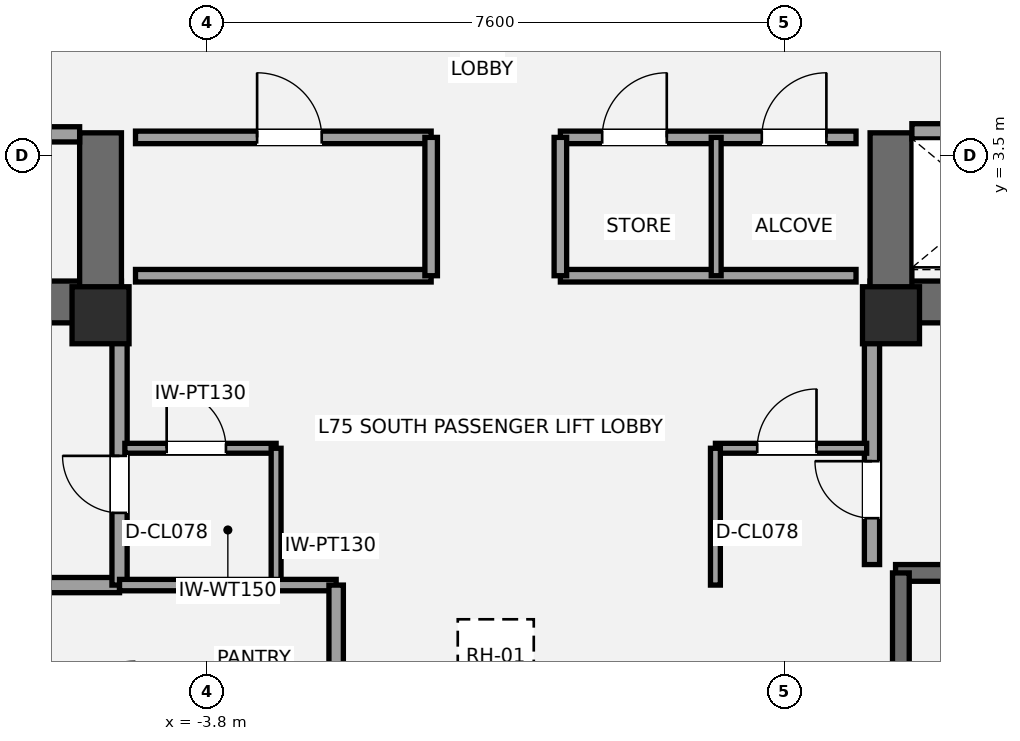
"""IFC4 building model, lengths in metres.
Left out: names, types, materials, properties, quantities, classifications, styles, units other than length and angle.
Written with IfcOpenShell. Run it as: python <this file> out.ifc"""

import sys

from ifc_helpers import new_model, si_unit, direction, frame, frame_2d, origin, origin_2d, place, context, subcontext, project, spatial, rectangle, extrude, element, fill, save


model = new_model("IFC4")
c1 = context("Model", 3, precision=1e-05, world=origin(), true_north=direction((0.0, 1.0)))
c2 = subcontext(c1, "Body", "Model", "MODEL_VIEW")
j1 = project(units=[si_unit("LENGTHUNIT", "METRE"), si_unit("PLANEANGLEUNIT", "RADIAN")], contexts=[c1])
p1 = place(None, origin())
s1 = spatial("IfcSite", under=j1, at=p1, CompositionType="ELEMENT")
p2 = place(p1, origin())
s2 = spatial("IfcBuilding", under=s1, at=p2, CompositionType="ELEMENT")
p3 = place(p2, frame((0.0, 0.0, 264.8)))
s3 = spatial("IfcBuildingStorey", under=s2, at=p3, CompositionType="ELEMENT", Elevation=264.8)
p4 = place(p3, frame((-4.925, 1.575, 0.0), z_axis=(0.0, 0.0, 1.0), x_axis=(-1.0, 0.0, 0.0)))
e1 = element("IfcWall", 1, at=p4, inside=s3, PredefinedType="SHEAR", context=c2, shape_type="SweptSolid", body=[
    extrude(rectangle(XDim=8.775, YDim=0.55, at=frame_2d((4.387, 0.0))), origin(), (0.0, 0.0, 1.0), 4.4),
])
p5 = place(p4, frame((5.375, 0.0, 0.0)))
e2 = element("IfcOpeningElement", 2, at=p5, cuts=e1, PredefinedType="OPENING", context=c2, shape_type="SweptSolid", body=[
    extrude(rectangle(XDim=1.05, YDim=2.15, at=frame_2d((0.525, 1.075))), frame((0.0, 0.285, 0.0), z_axis=(0.0, -1.0, 0.0), x_axis=(1.0, 0.0, 0.0)), (0.0, 0.0, 1.0), 0.57),
])
p6 = place(p4, frame((3.705, 0.0, 0.0)))
e3 = element("IfcOpeningElement", 3, at=p6, cuts=e1, PredefinedType="OPENING", context=c2, shape_type="SweptSolid", body=[
    extrude(rectangle(XDim=1.1, YDim=2.2, at=frame_2d((0.55, 1.1))), frame((0.0, 0.285, 0.0), z_axis=(0.0, -1.0, 0.0), x_axis=(1.0, 0.0, 0.0)), (0.0, 0.0, 1.0), 0.57),
])
p7 = place(p3, frame((-5.2, 1.3, 0.0), z_axis=(0.0, 0.0, 1.0), x_axis=(0.0, 1.0, 0.0)))
e4 = element("IfcWall", 4, at=p7, inside=s3, PredefinedType="SHEAR", context=c2, shape_type="SweptSolid", body=[
    extrude(rectangle(XDim=2.5, YDim=0.55, at=frame_2d((1.25, 0.0))), origin(), (0.0, 0.0, 1.0), 4.4),
])
p8 = place(p3, frame((13.7, 1.575, 0.0), z_axis=(0.0, 0.0, 1.0), x_axis=(-1.0, 0.0, 0.0)))
e5 = element("IfcWall", 5, at=p8, inside=s3, PredefinedType="SHEAR", context=c2, shape_type="SweptSolid", body=[
    extrude(rectangle(XDim=8.775, YDim=0.55, at=frame_2d((4.387, 0.0))), origin(), (0.0, 0.0, 1.0), 4.4),
])
p9 = place(p8, frame((2.35, 0.0, 0.0)))
e6 = element("IfcOpeningElement", 6, at=p9, cuts=e5, PredefinedType="OPENING", context=c2, shape_type="SweptSolid", body=[
    extrude(rectangle(XDim=1.05, YDim=2.15, at=frame_2d((0.525, 1.075))), frame((0.0, 0.285, 0.0), z_axis=(0.0, -1.0, 0.0), x_axis=(1.0, 0.0, 0.0)), (0.0, 0.0, 1.0), 0.57),
])
p10 = place(p8, frame((4.35, 0.0, 0.0)))
e7 = element("IfcOpeningElement", 7, at=p10, cuts=e5, PredefinedType="OPENING", context=c2, shape_type="SweptSolid", body=[
    extrude(rectangle(XDim=1.1, YDim=2.2, at=frame_2d((0.55, 1.1))), frame((0.0, 0.285, 0.0), z_axis=(0.0, -1.0, 0.0), x_axis=(1.0, 0.0, 0.0)), (0.0, 0.0, 1.0), 0.57),
])
p11 = place(p3, frame((5.2, 1.3, 0.0), z_axis=(0.0, 0.0, 1.0), x_axis=(0.0, 1.0, 0.0)))
e8 = element("IfcWall", 8, at=p11, inside=s3, PredefinedType="SHEAR", context=c2, shape_type="SweptSolid", body=[
    extrude(rectangle(XDim=2.5, YDim=0.55, at=frame_2d((1.25, 0.0))), origin(), (0.0, 0.0, 1.0), 4.4),
])
p12 = place(p3, frame((5.26, -1.99, 0.0), z_axis=(0.0, 0.0, 1.0), x_axis=(1.0, 0.0, 0.0)))
e9 = element("IfcWall", 9, at=p12, inside=s3, PredefinedType="SHEAR", context=c2, shape_type="SweptSolid", body=[
    extrude(rectangle(XDim=7.5, YDim=0.22, at=frame_2d((3.75, 0.0))), origin(), (0.0, 0.0, 1.0), 4.4),
])
p13 = place(p3, frame((5.33, -5.36, 0.0), z_axis=(0.0, 0.0, 1.0), x_axis=(0.0, 1.0, 0.0)))
e10 = element("IfcWall", 10, at=p13, inside=s3, PredefinedType="SHEAR", context=c2, shape_type="SweptSolid", body=[
    extrude(rectangle(XDim=3.37, YDim=0.22, at=frame_2d((1.685, 0.0))), origin(), (0.0, 0.0, 1.0), 4.4),
])
for number, where, z_axis, x_axis in (
    (11, (-5.2, 1.4, 0.0), (0.0, 0.0, 1.0), (1.0, 0.0, 0.0)),
    (12, (5.2, 1.4, 0.0), (0.0, 0.0, 1.0), (1.0, 0.0, 0.0)),
):
    element("IfcColumn", number, at=place(p3, frame(where, z_axis=z_axis, x_axis=x_axis)), inside=s3, PredefinedType="PILASTER", context=c2, shape_type="SweptSolid", body=[
        extrude(rectangle(XDim=0.75, YDim=0.75, at=origin_2d()), origin(), (0.0, 0.0, 1.0), 4.4),
    ])
p14 = place(p3, frame((-7.2, -2.15, 0.0), z_axis=(0.0, 0.0, 1.0), x_axis=(1.0, 0.0, 0.0)))
e13 = element("IfcWall", 13, at=p14, inside=s3, PredefinedType="SOLIDWALL", context=c2, shape_type="SweptSolid", body=[
    extrude(rectangle(XDim=2.25, YDim=0.2, at=frame_2d((1.125, 0.0))), origin(), (0.0, 0.0, 1.0), 4.2),
])
p15 = place(p3, frame((-4.95, -2.15, 0.0), z_axis=(0.0, 0.0, 1.0), x_axis=(0.0, 1.0, 0.0)))
e14 = element("IfcWall", 14, at=p15, inside=s3, PredefinedType="SOLIDWALL", context=c2, shape_type="SweptSolid", body=[
    extrude(rectangle(XDim=3.5, YDim=0.2, at=frame_2d((1.75, 0.0))), origin(), (0.0, 0.0, 1.0), 3.568),
])
p16 = place(p15, frame((0.95, 0.0, 0.0)))
e15 = element("IfcOpeningElement", 15, at=p16, cuts=e14, PredefinedType="OPENING", context=c2, shape_type="SweptSolid", body=[
    extrude(rectangle(XDim=0.75, YDim=2.1, at=frame_2d((0.375, 1.05))), frame((0.0, 0.11, 0.0), z_axis=(0.0, -1.0, 0.0), x_axis=(1.0, 0.0, 0.0)), (0.0, 0.0, 1.0), 0.22),
])
p17 = place(p3, frame((4.95, -1.88, 0.0), z_axis=(0.0, 0.0, 1.0), x_axis=(0.0, 1.0, 0.0)))
e16 = element("IfcWall", 16, at=p17, inside=s3, PredefinedType="SOLIDWALL", context=c2, shape_type="SweptSolid", body=[
    extrude(rectangle(XDim=3.23, YDim=0.2, at=frame_2d((1.615, 0.0))), origin(), (0.0, 0.0, 1.0), 3.568),
])
p18 = place(p17, frame((0.61, 0.0, 0.0)))
e17 = element("IfcOpeningElement", 17, at=p18, cuts=e16, PredefinedType="OPENING", context=c2, shape_type="SweptSolid", body=[
    extrude(rectangle(XDim=0.75, YDim=2.1, at=frame_2d((0.375, 1.05))), frame((0.0, 0.11, 0.0), z_axis=(0.0, -1.0, 0.0), x_axis=(1.0, 0.0, 0.0)), (0.0, 0.0, 1.0), 0.22),
])
p19 = place(p3, frame((-4.88, -0.35, 0.0), z_axis=(0.0, 0.0, 1.0), x_axis=(1.0, 0.0, 0.0)))
e18 = element("IfcWall", 18, at=p19, inside=s3, PredefinedType="PARTITIONING", context=c2, shape_type="SweptSolid", body=[
    extrude(rectangle(XDim=1.99, YDim=0.13, at=frame_2d((0.995, 0.0))), origin(), (0.0, 0.0, 1.0), 4.2),
])
p20 = place(p19, frame((0.55, 0.0, 0.0)))
e19 = element("IfcOpeningElement", 19, at=p20, cuts=e18, PredefinedType="OPENING", context=c2, shape_type="SweptSolid", body=[
    extrude(rectangle(XDim=0.78, YDim=2.1, at=frame_2d((0.39, 1.05))), frame((0.0, 0.075, 0.0), z_axis=(0.0, -1.0, 0.0), x_axis=(1.0, 0.0, 0.0)), (0.0, 0.0, 1.0), 0.15),
])
p21 = place(p3, frame((-2.89, -2.15, 0.0), z_axis=(0.0, 0.0, 1.0), x_axis=(0.0, 1.0, 0.0)))
e20 = element("IfcWall", 20, at=p21, inside=s3, PredefinedType="PARTITIONING", context=c2, shape_type="SweptSolid", body=[
    extrude(rectangle(XDim=1.8, YDim=0.13, at=frame_2d((0.9, 0.0))), origin(), (0.0, 0.0, 1.0), 4.2),
])
p22 = place(p3, frame((2.89, -0.35, 0.0), z_axis=(0.0, 0.0, 1.0), x_axis=(1.0, 0.0, 0.0)))
e21 = element("IfcWall", 21, at=p22, inside=s3, PredefinedType="PARTITIONING", context=c2, shape_type="SweptSolid", body=[
    extrude(rectangle(XDim=1.99, YDim=0.13, at=frame_2d((0.995, 0.0))), origin(), (0.0, 0.0, 1.0), 4.2),
])
p23 = place(p22, frame((0.55, 0.0, 0.0)))
e22 = element("IfcOpeningElement", 22, at=p23, cuts=e21, PredefinedType="OPENING", context=c2, shape_type="SweptSolid", body=[
    extrude(rectangle(XDim=0.78, YDim=2.1, at=frame_2d((0.39, 1.05))), frame((0.0, 0.075, 0.0), z_axis=(0.0, -1.0, 0.0), x_axis=(1.0, 0.0, 0.0)), (0.0, 0.0, 1.0), 0.15),
])
p24 = place(p3, frame((2.89, -2.15, 0.0), z_axis=(0.0, 0.0, 1.0), x_axis=(0.0, 1.0, 0.0)))
e23 = element("IfcWall", 23, at=p24, inside=s3, PredefinedType="PARTITIONING", context=c2, shape_type="SweptSolid", body=[
    extrude(rectangle(XDim=1.8, YDim=0.13, at=frame_2d((0.9, 0.0))), origin(), (0.0, 0.0, 1.0), 4.2),
])
p25 = place(p3, frame((-9.78, 3.78, 0.0), z_axis=(0.0, 0.0, 1.0), x_axis=(1.0, 0.0, 0.0)))
e24 = element("IfcWall", 24, at=p25, inside=s3, PredefinedType="SOLIDWALL", context=c2, shape_type="SweptSolid", body=[
    extrude(rectangle(XDim=4.305, YDim=0.2, at=frame_2d((2.152, 0.0))), origin(), (0.0, 0.0, 1.0), 4.2),
])
p26 = place(p25, frame((2.78, 0.0, 0.0)))
e25 = element("IfcOpeningElement", 25, at=p26, cuts=e24, PredefinedType="OPENING", context=c2, shape_type="SweptSolid", body=[
    extrude(rectangle(XDim=0.85, YDim=2.1, at=frame_2d((0.425, 1.05))), frame((0.0, 0.11, 0.0), z_axis=(0.0, -1.0, 0.0), x_axis=(1.0, 0.0, 0.0)), (0.0, 0.0, 1.0), 0.22),
])
p27 = place(p3, frame((5.475, 3.82, 0.0), z_axis=(0.0, 0.0, 1.0), x_axis=(1.0, 0.0, 0.0)))
e26 = element("IfcWall", 26, at=p27, inside=s3, PredefinedType="SOLIDWALL", context=c2, shape_type="SweptSolid", body=[
    extrude(rectangle(XDim=4.305, YDim=0.2, at=frame_2d((2.152, 0.0))), origin(), (0.0, 0.0, 1.0), 4.2),
])
p28 = place(p27, frame((0.65, 0.0, 0.0)))
e27 = element("IfcOpeningElement", 27, at=p28, cuts=e26, PredefinedType="OPENING", context=c2, shape_type="SweptSolid", body=[
    extrude(rectangle(XDim=1.2, YDim=2.2, at=frame_2d((0.6, 1.1))), frame((0.0, 0.11, 0.0), z_axis=(0.0, -1.0, 0.0), x_axis=(1.0, 0.0, 0.0)), (0.0, 0.0, 1.0), 0.22),
])
p29 = place(p3, frame((-4.74, 1.92, 0.0), z_axis=(0.0, 0.0, 1.0), x_axis=(1.0, 0.0, 0.0)))
e28 = element("IfcWall", 28, at=p29, inside=s3, PredefinedType="PARTITIONING", context=c2, shape_type="SweptSolid", body=[
    extrude(rectangle(XDim=3.89, YDim=0.165, at=frame_2d((1.945, 0.0))), origin(), (0.0, 0.0, 1.0), 3.34),
])
p30 = place(p3, frame((-4.74, 3.74, 0.0), z_axis=(0.0, 0.0, 1.0), x_axis=(1.0, 0.0, 0.0)))
e29 = element("IfcWall", 29, at=p30, inside=s3, PredefinedType="PARTITIONING", context=c2, shape_type="SweptSolid", body=[
    extrude(rectangle(XDim=3.89, YDim=0.165, at=frame_2d((1.945, 0.0))), origin(), (0.0, 0.0, 1.0), 4.2),
])
p31 = place(p30, frame((1.6, 0.0, 0.0)))
e30 = element("IfcOpeningElement", 30, at=p31, cuts=e29, PredefinedType="OPENING", context=c2, shape_type="SweptSolid", body=[
    extrude(rectangle(XDim=0.85, YDim=2.1, at=frame_2d((0.425, 1.05))), frame((0.0, 0.093, 0.0), z_axis=(0.0, -1.0, 0.0), x_axis=(1.0, 0.0, 0.0)), (0.0, 0.0, 1.0), 0.185),
])
p32 = place(p3, frame((-0.85, 1.92, 0.0), z_axis=(0.0, 0.0, 1.0), x_axis=(0.0, 1.0, 0.0)))
e31 = element("IfcWall", 31, at=p32, inside=s3, PredefinedType="PARTITIONING", context=c2, shape_type="SweptSolid", body=[
    extrude(rectangle(XDim=1.82, YDim=0.165, at=frame_2d((0.91, 0.0))), origin(), (0.0, 0.0, 1.0), 4.2),
])
p33 = place(p3, frame((0.85, 1.92, 0.0), z_axis=(0.0, 0.0, 1.0), x_axis=(1.0, 0.0, 0.0)))
e32 = element("IfcWall", 32, at=p33, inside=s3, PredefinedType="PARTITIONING", context=c2, shape_type="SweptSolid", body=[
    extrude(rectangle(XDim=3.89, YDim=0.165, at=frame_2d((1.945, 0.0))), origin(), (0.0, 0.0, 1.0), 3.34),
])
p34 = place(p3, frame((0.85, 3.74, 0.0), z_axis=(0.0, 0.0, 1.0), x_axis=(1.0, 0.0, 0.0)))
e33 = element("IfcWall", 33, at=p34, inside=s3, PredefinedType="PARTITIONING", context=c2, shape_type="SweptSolid", body=[
    extrude(rectangle(XDim=3.89, YDim=0.165, at=frame_2d((1.945, 0.0))), origin(), (0.0, 0.0, 1.0), 4.2),
])
p35 = place(p34, frame((0.55, 0.0, 0.0)))
e34 = element("IfcOpeningElement", 34, at=p35, cuts=e33, PredefinedType="OPENING", context=c2, shape_type="SweptSolid", body=[
    extrude(rectangle(XDim=0.85, YDim=2.1, at=frame_2d((0.425, 1.05))), frame((0.0, 0.093, 0.0), z_axis=(0.0, -1.0, 0.0), x_axis=(1.0, 0.0, 0.0)), (0.0, 0.0, 1.0), 0.185),
])
p36 = place(p34, frame((2.65, 0.0, 0.0)))
e35 = element("IfcOpeningElement", 35, at=p36, cuts=e33, PredefinedType="OPENING", context=c2, shape_type="SweptSolid", body=[
    extrude(rectangle(XDim=0.85, YDim=2.1, at=frame_2d((0.425, 1.05))), frame((0.0, 0.093, 0.0), z_axis=(0.0, -1.0, 0.0), x_axis=(1.0, 0.0, 0.0)), (0.0, 0.0, 1.0), 0.185),
])
p37 = place(p3, frame((0.85, 1.92, 0.0), z_axis=(0.0, 0.0, 1.0), x_axis=(0.0, 1.0, 0.0)))
e36 = element("IfcWall", 36, at=p37, inside=s3, PredefinedType="PARTITIONING", context=c2, shape_type="SweptSolid", body=[
    extrude(rectangle(XDim=1.82, YDim=0.165, at=frame_2d((0.91, 0.0))), origin(), (0.0, 0.0, 1.0), 4.2),
])
p38 = place(p3, frame((2.9, 1.92, 0.0), z_axis=(0.0, 0.0, 1.0), x_axis=(0.0, 1.0, 0.0)))
e37 = element("IfcWall", 37, at=p38, inside=s3, PredefinedType="PARTITIONING", context=c2, shape_type="SweptSolid", body=[
    extrude(rectangle(XDim=1.82, YDim=0.13, at=frame_2d((0.91, 0.0))), origin(), (0.0, 0.0, 1.0), 4.2),
])
p39 = place(p3, frame((-4.95, -2.15, 0.0), z_axis=(0.0, 0.0, 1.0), x_axis=(1.0, 0.0, 0.0)))
e38 = element("IfcWall", 38, at=p39, inside=s3, PredefinedType="PLUMBINGWALL", context=c2, shape_type="SweptSolid", body=[
    extrude(rectangle(XDim=2.85, YDim=0.15, at=frame_2d((1.425, 0.0))), origin(), (0.0, 0.0, 1.0), 4.2),
])
p40 = place(p3, frame((-2.1, -4.05, 0.0), z_axis=(0.0, 0.0, 1.0), x_axis=(0.0, 1.0, 0.0)))
e39 = element("IfcWall", 39, at=p40, inside=s3, PredefinedType="PLUMBINGWALL", context=c2, shape_type="SweptSolid", body=[
    extrude(rectangle(XDim=1.9, YDim=0.19, at=frame_2d((0.95, 0.0))), origin(), (0.0, 0.0, 1.0), 4.2),
])
p41 = place(p2, frame((0.0, 0.0, 269.2)))
p42 = place(p41, frame((0.0, 0.0, -0.2)))
p43 = place(p42, frame((0.0, -3.1, 0.0)))
p44 = place(p43, frame((0.0, 0.0, 0.15)))
e40 = element("IfcDoor", 40, at=p44, inside=s3, OperationType="SINGLE_SWING_LEFT", PredefinedType="TRAPDOOR", context=c2, shape_type="SweptSolid", body=[
    extrude(rectangle(XDim=1.0, YDim=1.0, at=origin_2d()), origin(), (0.0, 0.0, 1.0), 0.05),
])
p45 = place(p16, origin())
e41 = element("IfcDoor", 41, at=p45, inside=s3, OperationType="SINGLE_SWING_RIGHT", PredefinedType="DOOR", context=c2, shape_type="SweptSolid", body=[
    extrude(rectangle(XDim=0.75, YDim=2.1, at=frame_2d((0.375, 1.05))), frame((0.0, 0.025, 0.0), z_axis=(0.0, -1.0, 0.0), x_axis=(1.0, 0.0, 0.0)), (0.0, 0.0, 1.0), 0.05),
])
fill(e15, e41)
p46 = place(p18, origin())
e42 = element("IfcDoor", 42, at=p46, inside=s3, OperationType="SINGLE_SWING_RIGHT", PredefinedType="DOOR", context=c2, shape_type="SweptSolid", body=[
    extrude(rectangle(XDim=0.75, YDim=2.1, at=frame_2d((0.375, 1.05))), frame((0.0, 0.025, 0.0), z_axis=(0.0, -1.0, 0.0), x_axis=(1.0, 0.0, 0.0)), (0.0, 0.0, 1.0), 0.05),
])
fill(e17, e42)
p47 = place(p20, origin())
e43 = element("IfcDoor", 43, at=p47, inside=s3, OperationType="SINGLE_SWING_LEFT", PredefinedType="DOOR", context=c2, shape_type="SweptSolid", body=[
    extrude(rectangle(XDim=0.78, YDim=2.1, at=frame_2d((0.39, 1.05))), frame((0.0, 0.025, 0.0), z_axis=(0.0, -1.0, 0.0), x_axis=(1.0, 0.0, 0.0)), (0.0, 0.0, 1.0), 0.05),
])
fill(e19, e43)
p48 = place(p23, origin())
e44 = element("IfcDoor", 44, at=p48, inside=s3, OperationType="SINGLE_SWING_RIGHT", PredefinedType="DOOR", context=c2, shape_type="SweptSolid", body=[
    extrude(rectangle(XDim=0.78, YDim=2.1, at=frame_2d((0.39, 1.05))), frame((0.0, 0.025, 0.0), z_axis=(0.0, -1.0, 0.0), x_axis=(1.0, 0.0, 0.0)), (0.0, 0.0, 1.0), 0.05),
])
fill(e22, e44)
p49 = place(p31, origin())
e45 = element("IfcDoor", 45, at=p49, inside=s3, OperationType="SINGLE_SWING_LEFT", PredefinedType="DOOR", context=c2, shape_type="SweptSolid", body=[
    extrude(rectangle(XDim=0.85, YDim=2.1, at=frame_2d((0.425, 1.05))), frame((0.0, 0.025, 0.0), z_axis=(0.0, -1.0, 0.0), x_axis=(1.0, 0.0, 0.0)), (0.0, 0.0, 1.0), 0.05),
])
fill(e30, e45)
p50 = place(p35, origin())
e46 = element("IfcDoor", 46, at=p50, inside=s3, OperationType="SINGLE_SWING_RIGHT", PredefinedType="DOOR", context=c2, shape_type="SweptSolid", body=[
    extrude(rectangle(XDim=0.85, YDim=2.1, at=frame_2d((0.425, 1.05))), frame((0.0, 0.025, 0.0), z_axis=(0.0, -1.0, 0.0), x_axis=(1.0, 0.0, 0.0)), (0.0, 0.0, 1.0), 0.05),
])
fill(e34, e46)
p51 = place(p36, origin())
e47 = element("IfcDoor", 47, at=p51, inside=s3, OperationType="SINGLE_SWING_RIGHT", PredefinedType="DOOR", context=c2, shape_type="SweptSolid", body=[
    extrude(rectangle(XDim=0.85, YDim=2.1, at=frame_2d((0.425, 1.05))), frame((0.0, 0.025, 0.0), z_axis=(0.0, -1.0, 0.0), x_axis=(1.0, 0.0, 0.0)), (0.0, 0.0, 1.0), 0.05),
])
fill(e35, e47)
save(model, sys.argv[1])
